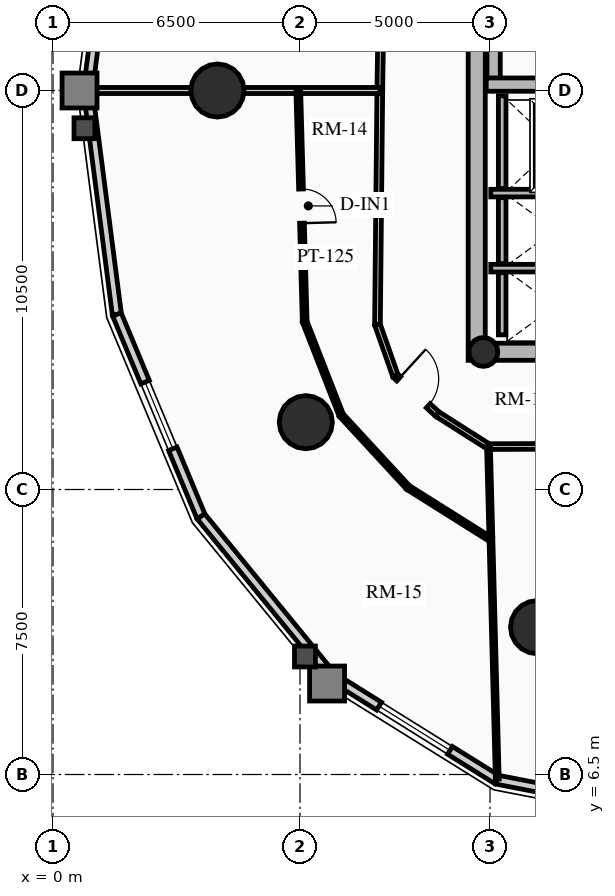
"""IFC4 building model, lengths in metres.
Left out: names, types, materials, properties, quantities, classifications, styles, units other than length and angle.
Written with IfcOpenShell. Run it as: python <this file> out.ifc"""

import sys

from ifc_helpers import new_model, si_unit, direction, frame, frame_2d, origin, origin_2d, place, context, subcontext, project, spatial, rectangle, circle, hollow_circle, extrude, source, transform, mapped, element, fill, save


model = new_model("IFC4")
c1 = context("Model", 3, precision=1e-05, world=origin(), true_north=direction((0.0, 1.0)))
c2 = subcontext(c1, "Body", "Model", "MODEL_VIEW")
j1 = project(units=[si_unit("LENGTHUNIT", "METRE"), si_unit("PLANEANGLEUNIT", "RADIAN")], contexts=[c1])
p1 = place(None, origin())
s1 = spatial("IfcSite", under=j1, at=p1, CompositionType="ELEMENT")
p2 = place(p1, origin())
s2 = spatial("IfcBuilding", under=s1, at=p2, CompositionType="ELEMENT")
p3 = place(p2, frame((0.0, 0.0, 129.16)))
s3 = spatial("IfcBuildingStorey", under=s2, at=p3, CompositionType="ELEMENT", Elevation=129.16)
p4 = place(p3, frame((11.15, 17.4, 0.0), z_axis=(0.0, 0.0, 1.0), x_axis=(0.0, 1.0, 0.0)))
e1 = element("IfcWall", 1, at=p4, inside=s3, PredefinedType="SHEAR", context=c2, shape_type="SweptSolid", body=[
    extrude(rectangle(XDim=14.2, YDim=0.45, at=frame_2d((7.1, 0.0))), origin(), (0.0, 0.0, 1.0), 3.72),
])
p5 = place(p3, frame((11.15, 17.625, 0.0), z_axis=(0.0, 0.0, 1.0), x_axis=(1.0, 0.0, 0.0)))
e2 = element("IfcWall", 2, at=p5, inside=s3, PredefinedType="SHEAR", context=c2, shape_type="SweptSolid", body=[
    extrude(rectangle(XDim=10.7, YDim=0.45, at=frame_2d((5.35, 0.0))), origin(), (0.0, 0.0, 1.0), 3.72),
])
m1 = source(origin(), c2, "Body", "SweptSolid", [
    extrude(rectangle(XDim=1.5, YDim=2.02, at=frame_2d((0.75, 1.01))), frame((0.0, 0.235, 0.0), z_axis=(0.0, -1.0, 0.0), x_axis=(1.0, 0.0, 0.0)), (0.0, 0.0, 1.0), 0.47),
])
p6 = place(p5, frame((5.45, 0.0, 0.0)))
e3 = element("IfcOpeningElement", 3, at=p6, cuts=e2, PredefinedType="OPENING", context=c2, shape_type="MappedRepresentation", body=[
    mapped(m1, transform((0.0, 0.0, 0.0), x_axis=(1.0, 0.0, 0.0), y_axis=(0.0, 1.0, 0.0), z_axis=(0.0, 0.0, 1.0), scale=1.0)),
])
p7 = place(p3, frame((11.595, 24.655, 0.0), z_axis=(0.0, 0.0, 1.0), x_axis=(0.0, 1.0, 0.0)))
e4 = element("IfcWall", 4, at=p7, inside=s3, PredefinedType="SHEAR", context=c2, shape_type="SweptSolid", body=[
    extrude(rectangle(XDim=6.72, YDim=0.35, at=frame_2d((3.36, 0.0))), origin(), (0.0, 0.0, 1.0), 3.72),
])
p8 = place(p3, frame((11.4, 24.655, 0.0), z_axis=(0.0, 0.0, 1.0), x_axis=(1.0, 0.0, 0.0)))
e5 = element("IfcWall", 5, at=p8, inside=s3, PredefinedType="SHEAR", context=c2, shape_type="SweptSolid", body=[
    extrude(rectangle(XDim=3.285, YDim=0.35, at=frame_2d((1.643, 0.0))), origin(), (0.0, 0.0, 1.0), 3.72),
])
p9 = place(p3, frame((11.325, 17.62, 0.0), z_axis=(0.0, 0.0, 1.0), x_axis=(1.0, 0.0, 0.0)))
e6 = element("IfcColumn", 6, at=p9, inside=s3, PredefinedType="COLUMN", context=c2, shape_type="SweptSolid", body=[
    extrude(hollow_circle(Radius=0.38, WallThickness=0.032, at=origin_2d()), origin(), (0.0, 0.0, 1.0), 3.72),
])
for number, where, z_axis, x_axis in (
    (7, (4.328, 24.5, 0.0), (0.0, 0.0, 1.0), (1.0, 0.0, 0.0)),
    (8, (6.653, 15.771, 0.0), (0.0, 0.0, 1.0), (1.0, 0.0, 0.0)),
    (9, (12.739, 10.377, 0.0), (0.0, 0.0, 1.0), (1.0, 0.0, 0.0)),
):
    element("IfcColumn", number, at=place(p3, frame(where, z_axis=z_axis, x_axis=x_axis)), inside=s3, PredefinedType="USERDEFINED", context=c2, shape_type="SweptSolid", body=[
        extrude(circle(Radius=0.7, at=origin_2d()), origin(), (0.0, 0.0, 1.0), 3.72),
    ])
p10 = place(p3, frame((0.919, 24.5, 0.0), z_axis=(0.0, 0.0, 1.0), x_axis=(0.128351991996, 0.991728675672, 0.0)))
e10 = element("IfcWall", 10, at=p10, inside=s3, PredefinedType="SOLIDWALL", context=c2, shape_type="SweptSolid", body=[
    extrude(rectangle(XDim=5.942, YDim=0.24, at=frame_2d((2.971, 0.0))), origin(), (0.0, 0.0, 1.0), 2.949),
])
m2 = source(origin(), c2, "Body", "SweptSolid", [
    extrude(rectangle(XDim=1.9, YDim=1.35, at=frame_2d((0.95, 0.675))), frame((0.0, 0.13, 0.0), z_axis=(0.0, -1.0, 0.0), x_axis=(1.0, 0.0, 0.0)), (0.0, 0.0, 1.0), 0.26),
])
p11 = place(p10, frame((2.021, 0.0, 0.65)))
e11 = element("IfcOpeningElement", 11, at=p11, cuts=e10, PredefinedType="OPENING", context=c2, shape_type="MappedRepresentation", body=[
    mapped(m2, transform((0.0, 0.0, 0.0), x_axis=(1.0, 0.0, 0.0), y_axis=(0.0, 1.0, 0.0), z_axis=(0.0, 0.0, 1.0), scale=1.0)),
])
p12 = place(p3, frame((1.682, 18.607, 0.0), z_axis=(0.0, 0.0, 1.0), x_axis=(-0.128351991996, 0.991728675672, 0.0)))
e12 = element("IfcWall", 12, at=p12, inside=s3, PredefinedType="SOLIDWALL", context=c2, shape_type="SweptSolid", body=[
    extrude(rectangle(XDim=5.942, YDim=0.24, at=frame_2d((2.971, 0.0))), origin(), (0.0, 0.0, 1.0), 2.949),
])
p13 = place(p3, frame((3.895, 13.291, 0.0), z_axis=(0.0, 0.0, 1.0), x_axis=(-0.384344417632, 0.923189779317, 0.0)))
e13 = element("IfcWall", 13, at=p13, inside=s3, PredefinedType="SOLIDWALL", context=c2, shape_type="SweptSolid", body=[
    extrude(rectangle(XDim=5.758, YDim=0.24, at=frame_2d((2.879, 0.0))), origin(), (0.0, 0.0, 1.0), 2.949),
])
p14 = place(p13, frame((1.929, 0.0, 0.65)))
e14 = element("IfcOpeningElement", 14, at=p14, cuts=e13, PredefinedType="OPENING", context=c2, shape_type="MappedRepresentation", body=[
    mapped(m2, transform((0.0, 0.0, 0.0), x_axis=(1.0, 0.0, 0.0), y_axis=(0.0, 1.0, 0.0), z_axis=(0.0, 0.0, 1.0), scale=1.0)),
])
p15 = place(p3, frame((7.342, 9.072, 0.0), z_axis=(0.0, 0.0, 1.0), x_axis=(-0.632700781152, 0.77439635945, 0.0)))
e15 = element("IfcWall", 15, at=p15, inside=s3, PredefinedType="SOLIDWALL", context=c2, shape_type="SweptSolid", body=[
    extrude(rectangle(XDim=5.448, YDim=0.24, at=frame_2d((2.724, 0.0))), origin(), (0.0, 0.0, 1.0), 2.949),
])
p16 = place(p3, frame((11.685, 6.363, 0.0), z_axis=(0.0, 0.0, 1.0), x_axis=(-0.848520380187, 0.529162701263, 0.0)))
e16 = element("IfcWall", 16, at=p16, inside=s3, PredefinedType="SOLIDWALL", context=c2, shape_type="SweptSolid", body=[
    extrude(rectangle(XDim=5.119, YDim=0.24, at=frame_2d((2.56, 0.0))), origin(), (0.0, 0.0, 1.0), 2.949),
])
m3 = source(origin(), c2, "Body", "SweptSolid", [
    extrude(rectangle(XDim=2.2, YDim=1.35, at=frame_2d((1.1, 0.675))), frame((0.0, 0.13, 0.0), z_axis=(0.0, -1.0, 0.0), x_axis=(1.0, 0.0, 0.0)), (0.0, 0.0, 1.0), 0.26),
])
p17 = place(p16, frame((1.459, 0.0, 0.65)))
e17 = element("IfcOpeningElement", 17, at=p17, cuts=e16, PredefinedType="OPENING", context=c2, shape_type="MappedRepresentation", body=[
    mapped(m3, transform((0.0, 0.0, 0.0), x_axis=(1.0, 0.0, 0.0), y_axis=(0.0, 1.0, 0.0), z_axis=(0.0, 0.0, 1.0), scale=1.0)),
])
p18 = place(p3, frame((16.5, 5.43, 0.0), z_axis=(0.0, 0.0, 1.0), x_axis=(-0.981723785992, 0.190311344954, 0.0)))
e18 = element("IfcWall", 18, at=p18, inside=s3, PredefinedType="SOLIDWALL", context=c2, shape_type="SweptSolid", body=[
    extrude(rectangle(XDim=4.904, YDim=0.24, at=frame_2d((2.452, 0.0))), origin(), (0.0, 0.0, 1.0), 2.949),
])
p19 = place(p18, frame((1.502, 0.0, 0.65)))
e19 = element("IfcOpeningElement", 19, at=p19, cuts=e18, PredefinedType="OPENING", context=c2, shape_type="MappedRepresentation", body=[
    mapped(m2, transform((0.0, 0.0, 0.0), x_axis=(1.0, 0.0, 0.0), y_axis=(0.0, 1.0, 0.0), z_axis=(0.0, 0.0, 1.0), scale=1.0)),
])
p20 = place(p3, frame((11.52, 21.8, 0.0), z_axis=(0.0, 0.0, 1.0), x_axis=(1.0, 0.0, 0.0)))
e20 = element("IfcWall", 20, at=p20, inside=s3, PredefinedType="SHEAR", context=c2, shape_type="SweptSolid", body=[
    extrude(rectangle(XDim=2.97, YDim=0.2, at=frame_2d((1.485, 0.0))), origin(), (0.0, 0.0, 1.0), 3.72),
])
p21 = place(p3, frame((11.82, 21.92, 0.0), z_axis=(0.0, 0.0, 1.0), x_axis=(0.0, 1.0, 0.0)))
e21 = element("IfcWall", 21, at=p21, inside=s3, PredefinedType="SHEAR", context=c2, shape_type="SweptSolid", body=[
    extrude(rectangle(XDim=2.44, YDim=0.2, at=frame_2d((1.22, 0.0))), origin(), (0.0, 0.0, 1.0), 3.72),
])
p22 = place(p3, frame((11.52, 19.825, 0.0), z_axis=(0.0, 0.0, 1.0), x_axis=(1.0, 0.0, 0.0)))
e22 = element("IfcWall", 22, at=p22, inside=s3, PredefinedType="SHEAR", context=c2, shape_type="SweptSolid", body=[
    extrude(rectangle(XDim=2.97, YDim=0.2, at=frame_2d((1.485, 0.0))), origin(), (0.0, 0.0, 1.0), 3.72),
])
p23 = place(p3, frame((11.82, 19.945, 0.0), z_axis=(0.0, 0.0, 1.0), x_axis=(0.0, 1.0, 0.0)))
e23 = element("IfcWall", 23, at=p23, inside=s3, PredefinedType="SHEAR", context=c2, shape_type="SweptSolid", body=[
    extrude(rectangle(XDim=1.735, YDim=0.2, at=frame_2d((0.867, 0.0))), origin(), (0.0, 0.0, 1.0), 3.72),
])
p24 = place(p3, frame((11.82, 18.07, 0.0), z_axis=(0.0, 0.0, 1.0), x_axis=(0.0, 1.0, 0.0)))
e24 = element("IfcWall", 24, at=p24, inside=s3, PredefinedType="SHEAR", context=c2, shape_type="SweptSolid", body=[
    extrude(rectangle(XDim=1.635, YDim=0.2, at=frame_2d((0.817, 0.0))), origin(), (0.0, 0.0, 1.0), 3.72),
])
p25 = place(p3, frame((8.693, 30.544, 0.0), z_axis=(0.0, 0.0, 1.0), x_axis=(-0.015307007986, -0.99988284089, 0.0)))
e25 = element("IfcWall", 25, at=p25, inside=s3, PredefinedType="PARTITIONING", context=c2, shape_type="SweptSolid", body=[
    extrude(rectangle(XDim=6.045, YDim=0.15, at=frame_2d((3.022, 0.0))), origin(), (0.0, 0.0, 1.0), 3.425),
])
p26 = place(p3, frame((8.6, 24.5, 0.0), z_axis=(0.0, 0.0, 1.0), x_axis=(-0.010023665349, -0.999949761805, 0.0)))
e26 = element("IfcWall", 26, at=p26, inside=s3, PredefinedType="PARTITIONING", context=c2, shape_type="SweptSolid", body=[
    extrude(rectangle(XDim=6.162, YDim=0.15, at=frame_2d((3.081, 0.0))), origin(), (0.0, 0.0, 1.0), 2.995),
])
p27 = place(p3, frame((8.538, 18.338, 0.0), z_axis=(0.0, 0.0, 1.0), x_axis=(0.331358150167, -0.94350504838, 0.0)))
e27 = element("IfcWall", 27, at=p27, inside=s3, PredefinedType="PARTITIONING", context=c2, shape_type="SweptSolid", body=[
    extrude(rectangle(XDim=1.424, YDim=0.15, at=frame_2d((0.712, 0.0))), origin(), (0.0, 0.0, 1.0), 2.995),
])
p28 = place(p3, frame((9.01, 16.994, 0.0), z_axis=(0.0, 0.0, 1.0), x_axis=(0.737701798986, -0.67512669609, 0.0)))
e28 = element("IfcWall", 28, at=p28, inside=s3, PredefinedType="PARTITIONING", context=c2, shape_type="SweptSolid", body=[
    extrude(rectangle(XDim=1.498, YDim=0.15, at=frame_2d((0.749, 0.0))), origin(), (0.0, 0.0, 1.0), 2.995),
])
m4 = source(origin(), c2, "Body", "SweptSolid", [
    extrude(rectangle(XDim=1.05, YDim=2.015, at=frame_2d((0.525, 1.007))), frame((0.0, 0.085, 0.0), z_axis=(0.0, -1.0, 0.0), x_axis=(1.0, 0.0, 0.0)), (0.0, 0.0, 1.0), 0.17),
])
p29 = place(p28, frame((0.12, 0.0, 0.0)))
e29 = element("IfcOpeningElement", 29, at=p29, cuts=e28, PredefinedType="OPENING", context=c2, shape_type="MappedRepresentation", body=[
    mapped(m4, transform((0.0, 0.0, 0.0), x_axis=(1.0, 0.0, 0.0), y_axis=(0.0, 1.0, 0.0), z_axis=(0.0, 0.0, 1.0), scale=1.0)),
])
p30 = place(p3, frame((10.115, 15.983, 0.0), z_axis=(0.0, 0.0, 1.0), x_axis=(0.843995849351, -0.536349705209, 0.0)))
e30 = element("IfcWall", 30, at=p30, inside=s3, PredefinedType="PARTITIONING", context=c2, shape_type="SweptSolid", body=[
    extrude(rectangle(XDim=1.593, YDim=0.15, at=frame_2d((0.796, 0.0))), origin(), (0.0, 0.0, 1.0), 2.995),
])
p31 = place(p3, frame((11.46, 15.129, 0.0), z_axis=(0.0, 0.0, 1.0), x_axis=(0.999993513287, 0.003601858435, 0.0)))
e31 = element("IfcWall", 31, at=p31, inside=s3, PredefinedType="PARTITIONING", context=c2, shape_type="SweptSolid", body=[
    extrude(rectangle(XDim=3.321, YDim=0.15, at=frame_2d((1.661, 0.0))), origin(), (0.0, 0.0, 1.0), 2.995),
])
p32 = place(p3, frame((8.6, 24.5, 0.0), z_axis=(0.0, 0.0, 1.0), x_axis=(-1.0, 0.0, 0.0)))
e32 = element("IfcWall", 32, at=p32, inside=s3, PredefinedType="PARTITIONING", context=c2, shape_type="SweptSolid", body=[
    extrude(rectangle(XDim=7.661, YDim=0.16, at=frame_2d((3.831, 0.0))), origin(), (0.0, 0.0, 1.0), 2.949),
])
p33 = place(p3, frame((11.46, 15.129, 0.0), z_axis=(0.0, 0.0, 1.0), x_axis=(0.026480592098, -0.999649327636, 0.0)))
e33 = element("IfcWall", 33, at=p33, inside=s3, PredefinedType="MOVABLE", context=c2, shape_type="SweptSolid", body=[
    extrude(rectangle(XDim=8.75, YDim=0.1, at=frame_2d((4.375, 0.0))), origin(), (0.0, 0.0, 1.0), 2.949),
])
p34 = place(p3, frame((6.455, 24.5, 0.0), z_axis=(0.0, 0.0, 1.0), x_axis=(0.027753708707, -0.999614791634, 0.0)))
e34 = element("IfcWall", 34, at=p34, inside=s3, PredefinedType="PARTITIONING", context=c2, shape_type="SweptSolid", body=[
    extrude(rectangle(XDim=6.087, YDim=0.125, at=frame_2d((3.044, 0.0))), origin(), (0.0, 0.0, 1.0), 2.995),
])
m5 = source(origin(), c2, "Body", "SweptSolid", [
    extrude(rectangle(XDim=0.9, YDim=2.005, at=frame_2d((0.45, 1.002))), frame((0.0, 0.073, 0.0), z_axis=(0.0, -1.0, 0.0), x_axis=(1.0, 0.0, 0.0)), (0.0, 0.0, 1.0), 0.145),
])
p35 = place(p34, frame((2.594, 0.0, 0.0)))
e35 = element("IfcOpeningElement", 35, at=p35, cuts=e34, PredefinedType="OPENING", context=c2, shape_type="MappedRepresentation", body=[
    mapped(m5, transform((0.0, 0.0, 0.0), x_axis=(1.0, 0.0, 0.0), y_axis=(0.0, 1.0, 0.0), z_axis=(0.0, 0.0, 1.0), scale=1.0)),
])
p36 = place(p3, frame((6.624, 18.415, 0.0), z_axis=(0.0, 0.0, 1.0), x_axis=(0.363854295337, -0.931455877519, 0.0)))
e36 = element("IfcWall", 36, at=p36, inside=s3, PredefinedType="PARTITIONING", context=c2, shape_type="SweptSolid", body=[
    extrude(rectangle(XDim=2.635, YDim=0.125, at=frame_2d((1.317, 0.0))), origin(), (0.0, 0.0, 1.0), 2.995),
])
p37 = place(p3, frame((7.583, 15.961, 0.0), z_axis=(0.0, 0.0, 1.0), x_axis=(0.677838563189, -0.735210774032, 0.0)))
e37 = element("IfcWall", 37, at=p37, inside=s3, PredefinedType="PARTITIONING", context=c2, shape_type="SweptSolid", body=[
    extrude(rectangle(XDim=2.596, YDim=0.125, at=frame_2d((1.298, 0.0))), origin(), (0.0, 0.0, 1.0), 3.425),
])
p38 = place(p3, frame((9.342, 14.052, 0.0), z_axis=(0.0, 0.0, 1.0), x_axis=(0.846526826244, -0.532346064557, 0.0)))
e38 = element("IfcWall", 38, at=p38, inside=s3, PredefinedType="PARTITIONING", context=c2, shape_type="SweptSolid", body=[
    extrude(rectangle(XDim=2.578, YDim=0.125, at=frame_2d((1.289, 0.0))), origin(), (0.0, 0.0, 1.0), 2.995),
])
m6 = source(origin(), c2, "Body", "SweptSolid", [
    extrude(rectangle(XDim=1.9, YDim=1.35, at=frame_2d((0.95, 0.675))), frame((0.0, 0.03, 0.0), z_axis=(0.0, -1.0, 0.0), x_axis=(1.0, 0.0, 0.0)), (0.0, 0.0, 1.0), 0.06),
])
p39 = place(p14, origin())
e39 = element("IfcWindow", 39, at=p39, inside=s3, PartitioningType="DOUBLE_PANEL_VERTICAL", PredefinedType="WINDOW", context=c2, shape_type="MappedRepresentation", body=[
    mapped(m6, transform((0.0, 0.0, 0.0), x_axis=(1.0, 0.0, 0.0), y_axis=(0.0, 1.0, 0.0), z_axis=(0.0, 0.0, 1.0), scale=1.0)),
])
fill(e14, e39)
m7 = source(origin(), c2, "Body", "SweptSolid", [
    extrude(rectangle(XDim=2.2, YDim=1.35, at=frame_2d((1.1, 0.675))), frame((0.0, 0.03, 0.0), z_axis=(0.0, -1.0, 0.0), x_axis=(1.0, 0.0, 0.0)), (0.0, 0.0, 1.0), 0.06),
])
p40 = place(p17, origin())
e40 = element("IfcWindow", 40, at=p40, inside=s3, PartitioningType="DOUBLE_PANEL_VERTICAL", PredefinedType="WINDOW", context=c2, shape_type="MappedRepresentation", body=[
    mapped(m7, transform((0.0, 0.0, 0.0), x_axis=(1.0, 0.0, 0.0), y_axis=(0.0, 1.0, 0.0), z_axis=(0.0, 0.0, 1.0), scale=1.0)),
])
fill(e17, e40)
m8 = source(origin(), c2, "Body", "SweptSolid", [
    extrude(rectangle(XDim=1.05, YDim=2.015, at=frame_2d((0.525, 1.007))), frame((0.0, 0.025, 0.0), z_axis=(0.0, -1.0, 0.0), x_axis=(1.0, 0.0, 0.0)), (0.0, 0.0, 1.0), 0.05),
])
p41 = place(p29, origin())
e41 = element("IfcDoor", 41, at=p41, inside=s3, OperationType="SINGLE_SWING_LEFT", PredefinedType="DOOR", context=c2, shape_type="MappedRepresentation", body=[
    mapped(m8, transform((0.0, 0.0, 0.0), x_axis=(1.0, 0.0, 0.0), y_axis=(0.0, 1.0, 0.0), z_axis=(0.0, 0.0, 1.0), scale=1.0)),
])
fill(e29, e41)
m9 = source(origin(), c2, "Body", "SweptSolid", [
    extrude(rectangle(XDim=0.9, YDim=2.005, at=frame_2d((0.45, 1.002))), frame((0.0, 0.025, 0.0), z_axis=(0.0, -1.0, 0.0), x_axis=(1.0, 0.0, 0.0)), (0.0, 0.0, 1.0), 0.05),
])
p42 = place(p35, origin())
e42 = element("IfcDoor", 42, at=p42, inside=s3, OperationType="SINGLE_SWING_RIGHT", PredefinedType="DOOR", context=c2, shape_type="MappedRepresentation", body=[
    mapped(m9, transform((0.0, 0.0, 0.0), x_axis=(1.0, 0.0, 0.0), y_axis=(0.0, 1.0, 0.0), z_axis=(0.0, 0.0, 1.0), scale=1.0)),
])
fill(e35, e42)
save(model, sys.argv[1])
